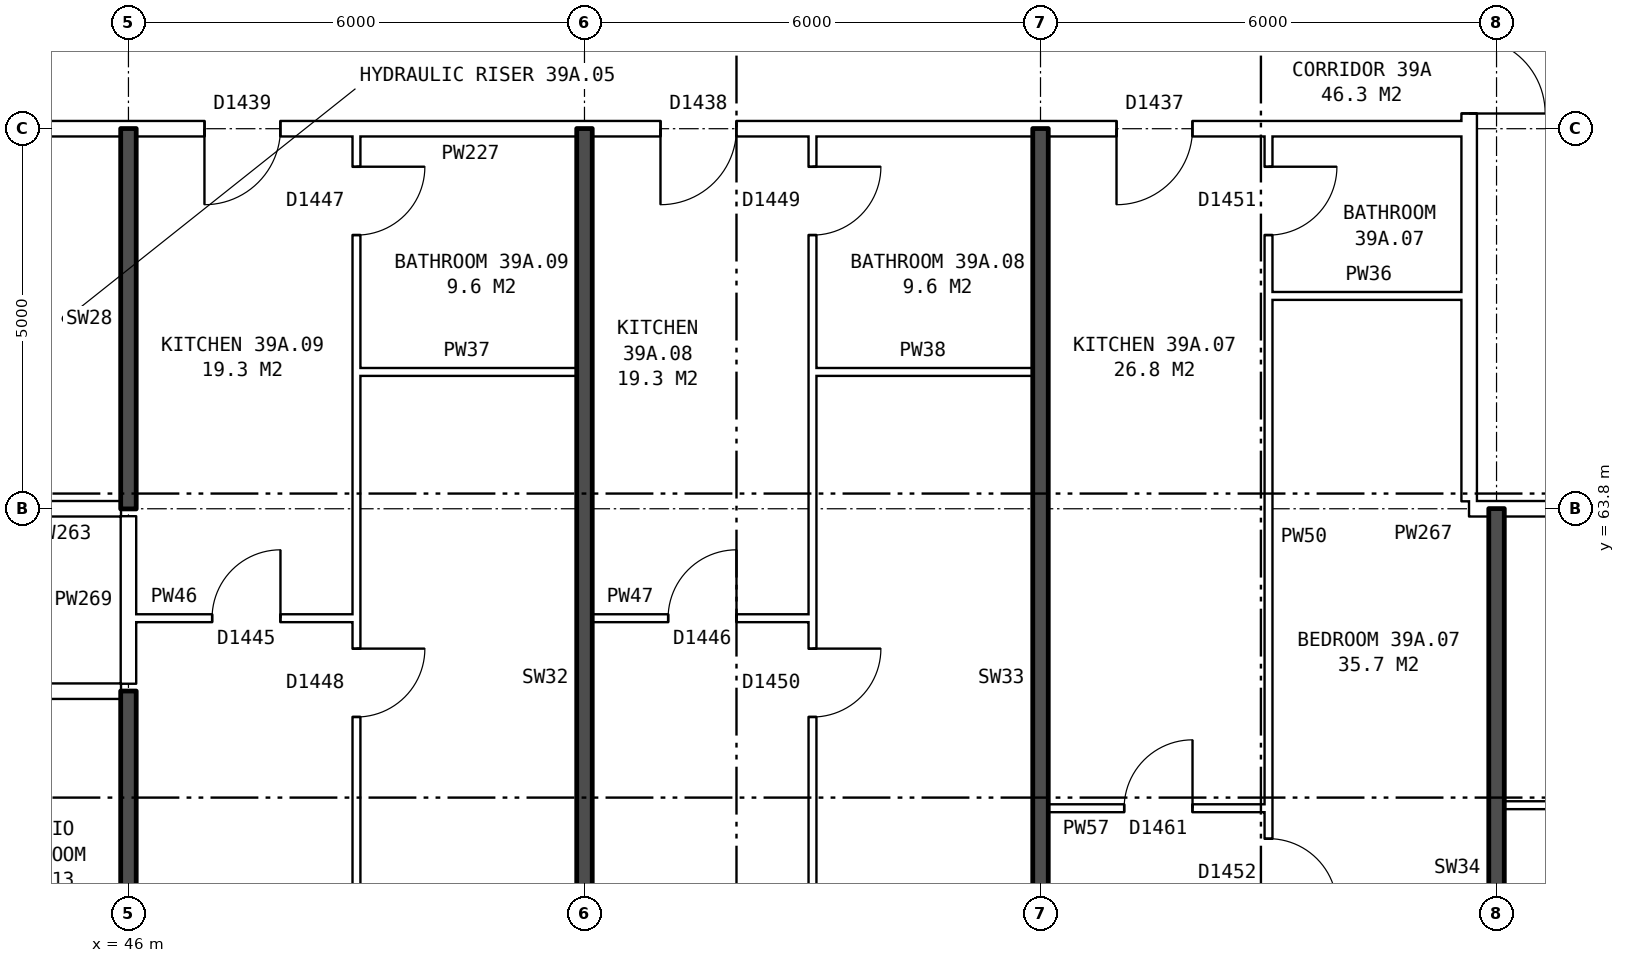
"""IFC4 building model, lengths in metres.
Left out: names, types, materials, properties, quantities, classifications, styles, units other than length and angle.
Written with IfcOpenShell. Run it as: python <this file> out.ifc"""

import sys

from ifc_helpers import new_model, si_unit, direction, frame, frame_2d, origin, place, context, subcontext, project, spatial, rectangle, extrude, element, fill, save


model = new_model("IFC4")
c1 = context("Model", 3, precision=1e-05, world=origin(), true_north=direction((0.0, 1.0)))
c2 = subcontext(c1, "Body", "Model", "MODEL_VIEW")
j1 = project(units=[si_unit("LENGTHUNIT", "METRE"), si_unit("PLANEANGLEUNIT", "RADIAN")], contexts=[c1])
p1 = place(None, origin())
s1 = spatial("IfcSite", under=j1, at=p1, CompositionType="ELEMENT")
p2 = place(p1, origin())
s2 = spatial("IfcBuilding", under=s1, at=p2, CompositionType="ELEMENT")
p3 = place(p2, frame((0.0, 0.0, 139.2)))
s3 = spatial("IfcBuildingStorey", under=s2, at=p3, CompositionType="ELEMENT", Elevation=139.2)
p4 = place(p3, frame((63.64, 63.9, 0.0), z_axis=(0.0, 0.0, 1.0), x_axis=(0.0, 1.0, 0.0)))
e1 = element("IfcWall", 1, at=p4, inside=s3, PredefinedType="PARTITIONING", context=c2, shape_type="SweptSolid", body=[
    extrude(rectangle(XDim=12.2, YDim=0.2, at=frame_2d((6.1, 0.0))), origin(), (0.0, 0.0, 1.0), 2.85),
])
p5 = place(p4, frame((5.1, 0.0, 0.0)))
e2 = element("IfcOpeningElement", 2, at=p5, cuts=e1, PredefinedType="OPENING", context=c2, shape_type="SweptSolid", body=[
    extrude(rectangle(XDim=2.0, YDim=2.1, at=frame_2d((1.0, 1.05))), frame((0.0, 0.11, 0.0), z_axis=(0.0, -1.0, 0.0), x_axis=(1.0, 0.0, 0.0)), (0.0, 0.0, 1.0), 0.22),
])
p6 = place(p3, frame((58.1, 59.86, 0.0), z_axis=(0.0, 0.0, 1.0), x_axis=(1.0, 0.0, 0.0)))
e3 = element("IfcWall", 3, at=p6, inside=s3, PredefinedType="PARTITIONING", context=c2, shape_type="SweptSolid", body=[
    extrude(rectangle(XDim=2.9, YDim=0.1, at=frame_2d((1.45, 0.0))), origin(), (0.0, 0.0, 1.0), 2.85),
])
p7 = place(p6, frame((1.0, 0.0, 0.0)))
e4 = element("IfcOpeningElement", 4, at=p7, cuts=e3, PredefinedType="OPENING", context=c2, shape_type="SweptSolid", body=[
    extrude(rectangle(XDim=0.9, YDim=2.1, at=frame_2d((0.45, 1.05))), frame((0.0, 0.06, 0.0), z_axis=(0.0, -1.0, 0.0), x_axis=(1.0, 0.0, 0.0)), (0.0, 0.0, 1.0), 0.12),
])
p8 = place(p3, frame((64.1, 59.9, 0.0), z_axis=(0.0, 0.0, 1.0), x_axis=(1.0, 0.0, 0.0)))
e5 = element("IfcWall", 5, at=p8, inside=s3, PredefinedType="PARTITIONING", context=c2, shape_type="SweptSolid", body=[
    extrude(rectangle(XDim=5.8, YDim=0.1, at=frame_2d((2.9, 0.0))), origin(), (0.0, 0.0, 1.0), 2.85),
])
p9 = place(p8, frame((3.6, 0.0, 0.0)))
e6 = element("IfcOpeningElement", 6, at=p9, cuts=e5, PredefinedType="OPENING", context=c2, shape_type="SweptSolid", body=[
    extrude(rectangle(XDim=0.9, YDim=2.1, at=frame_2d((0.45, 1.05))), frame((0.0, 0.06, 0.0), z_axis=(0.0, -1.0, 0.0), x_axis=(1.0, 0.0, 0.0)), (0.0, 0.0, 1.0), 0.12),
])
p10 = place(p8, frame((0.7, 0.0, 0.0)))
e7 = element("IfcOpeningElement", 7, at=p10, cuts=e5, PredefinedType="OPENING", context=c2, shape_type="SweptSolid", body=[
    extrude(rectangle(XDim=0.9, YDim=2.1, at=frame_2d((0.45, 1.05))), frame((0.0, 0.06, 0.0), z_axis=(0.0, -1.0, 0.0), x_axis=(1.0, 0.0, 0.0)), (0.0, 0.0, 1.0), 0.12),
])
p11 = place(p3, frame((27.11, 61.4, 0.0), z_axis=(0.0, 0.0, 1.0), x_axis=(1.0, 0.0, 0.0)))
e8 = element("IfcWall", 8, at=p11, inside=s3, PredefinedType="PARTITIONING", context=c2, shape_type="SweptSolid", body=[
    extrude(rectangle(XDim=18.79, YDim=0.2, at=frame_2d((9.395, 0.0))), origin(), (0.0, 0.0, 1.0), 2.85),
])
p12 = place(p11, frame((14.19, 0.0, 0.0)))
e9 = element("IfcOpeningElement", 9, at=p12, cuts=e8, PredefinedType="OPENING", context=c2, shape_type="SweptSolid", body=[
    extrude(rectangle(XDim=1.0, YDim=2.1, at=frame_2d((0.5, 1.05))), frame((0.0, 0.11, 0.0), z_axis=(0.0, -1.0, 0.0), x_axis=(1.0, 0.0, 0.0)), (0.0, 0.0, 1.0), 0.22),
])
p13 = place(p11, frame((8.19, 0.0, 0.0)))
e10 = element("IfcOpeningElement", 10, at=p13, cuts=e8, PredefinedType="OPENING", context=c2, shape_type="SweptSolid", body=[
    extrude(rectangle(XDim=1.0, YDim=2.1, at=frame_2d((0.5, 1.05))), frame((0.0, 0.11, 0.0), z_axis=(0.0, -1.0, 0.0), x_axis=(1.0, 0.0, 0.0)), (0.0, 0.0, 1.0), 0.22),
])
p14 = place(p11, frame((4.59, 0.0, 0.0)))
e11 = element("IfcOpeningElement", 11, at=p14, cuts=e8, PredefinedType="OPENING", context=c2, shape_type="SweptSolid", body=[
    extrude(rectangle(XDim=1.0, YDim=2.1, at=frame_2d((0.5, 1.05))), frame((0.0, 0.11, 0.0), z_axis=(0.0, -1.0, 0.0), x_axis=(1.0, 0.0, 0.0)), (0.0, 0.0, 1.0), 0.22),
])
p15 = place(p3, frame((46.1, 62.36, 0.0), z_axis=(0.0, 0.0, 1.0), x_axis=(1.0, 0.0, 0.0)))
e12 = element("IfcWall", 12, at=p15, inside=s3, PredefinedType="PARTITIONING", context=c2, shape_type="SweptSolid", body=[
    extrude(rectangle(XDim=2.9, YDim=0.1, at=frame_2d((1.45, 0.0))), origin(), (0.0, 0.0, 1.0), 2.85),
])
p16 = place(p15, frame((1.0, 0.0, 0.0)))
e13 = element("IfcOpeningElement", 13, at=p16, cuts=e12, PredefinedType="OPENING", context=c2, shape_type="SweptSolid", body=[
    extrude(rectangle(XDim=0.9, YDim=2.1, at=frame_2d((0.45, 1.05))), frame((0.0, 0.06, 0.0), z_axis=(0.0, -1.0, 0.0), x_axis=(1.0, 0.0, 0.0)), (0.0, 0.0, 1.0), 0.12),
])
p17 = place(p3, frame((52.1, 62.36, 0.0), z_axis=(0.0, 0.0, 1.0), x_axis=(1.0, 0.0, 0.0)))
e14 = element("IfcWall", 14, at=p17, inside=s3, PredefinedType="PARTITIONING", context=c2, shape_type="SweptSolid", body=[
    extrude(rectangle(XDim=2.9, YDim=0.1, at=frame_2d((1.45, 0.0))), origin(), (0.0, 0.0, 1.0), 2.85),
])
p18 = place(p17, frame((1.0, 0.0, 0.0)))
e15 = element("IfcOpeningElement", 15, at=p18, cuts=e14, PredefinedType="OPENING", context=c2, shape_type="SweptSolid", body=[
    extrude(rectangle(XDim=0.9, YDim=2.1, at=frame_2d((0.45, 1.05))), frame((0.0, 0.06, 0.0), z_axis=(0.0, -1.0, 0.0), x_axis=(1.0, 0.0, 0.0)), (0.0, 0.0, 1.0), 0.12),
])
p19 = place(p3, frame((44.36, 63.8, 0.0), z_axis=(0.0, 0.0, 1.0), x_axis=(1.0, 0.0, 0.0)))
e16 = element("IfcWall", 16, at=p19, inside=s3, PredefinedType="PARTITIONING", context=c2, shape_type="SweptSolid", body=[
    extrude(rectangle(XDim=1.54, YDim=0.2, at=frame_2d((0.77, 0.0))), origin(), (0.0, 0.0, 1.0), 2.85),
])
p20 = place(p3, frame((63.64, 63.8, 0.0), z_axis=(0.0, 0.0, 1.0), x_axis=(1.0, 0.0, 0.0)))
e17 = element("IfcWall", 17, at=p20, inside=s3, PredefinedType="PARTITIONING", context=c2, shape_type="SweptSolid", body=[
    extrude(rectangle(XDim=3.0, YDim=0.2, at=frame_2d((1.5, 0.0))), origin(), (0.0, 0.0, 1.0), 2.85),
])
p21 = place(p20, frame((1.18, 0.0, 0.0)))
e18 = element("IfcOpeningElement", 18, at=p21, cuts=e17, PredefinedType="OPENING", context=c2, shape_type="SweptSolid", body=[
    extrude(rectangle(XDim=1.0, YDim=2.1, at=frame_2d((0.5, 1.05))), frame((0.0, 0.11, 0.0), z_axis=(0.0, -1.0, 0.0), x_axis=(1.0, 0.0, 0.0)), (0.0, 0.0, 1.0), 0.22),
])
for number, where, z_axis, x_axis in (
    (19, (49.0, 65.6, 0.0), (0.0, 0.0, 1.0), (1.0, 0.0, 0.0)),
    (20, (55.0, 65.6, 0.0), (0.0, 0.0, 1.0), (1.0, 0.0, 0.0)),
):
    element("IfcWall", number, at=place(p3, frame(where, z_axis=z_axis, x_axis=x_axis)), inside=s3, PredefinedType="PARTITIONING", context=c2, shape_type="SweptSolid", body=[
        extrude(rectangle(XDim=2.9, YDim=0.1, at=frame_2d((1.45, 0.0))), origin(), (0.0, 0.0, 1.0), 2.85),
    ])
p22 = place(p3, frame((61.0, 66.6, 0.0), z_axis=(0.0, 0.0, 1.0), x_axis=(1.0, 0.0, 0.0)))
e21 = element("IfcWall", 21, at=p22, inside=s3, PredefinedType="PARTITIONING", context=c2, shape_type="SweptSolid", body=[
    extrude(rectangle(XDim=2.64, YDim=0.1, at=frame_2d((1.32, 0.0))), origin(), (0.0, 0.0, 1.0), 2.85),
])
p23 = place(p3, frame((44.36, 68.8, 0.0), z_axis=(0.0, 0.0, 1.0), x_axis=(1.0, 0.0, 0.0)))
e22 = element("IfcWall", 22, at=p23, inside=s3, PredefinedType="PARTITIONING", context=c2, shape_type="SweptSolid", body=[
    extrude(rectangle(XDim=19.28, YDim=0.2, at=frame_2d((9.64, 0.0))), origin(), (0.0, 0.0, 1.0), 2.85),
])
p24 = place(p23, frame((14.64, 0.0, 0.0)))
e23 = element("IfcOpeningElement", 23, at=p24, cuts=e22, PredefinedType="OPENING", context=c2, shape_type="SweptSolid", body=[
    extrude(rectangle(XDim=1.0, YDim=2.1, at=frame_2d((0.5, 1.05))), frame((0.0, 0.11, 0.0), z_axis=(0.0, -1.0, 0.0), x_axis=(1.0, 0.0, 0.0)), (0.0, 0.0, 1.0), 0.22),
])
p25 = place(p23, frame((8.64, 0.0, 0.0)))
e24 = element("IfcOpeningElement", 24, at=p25, cuts=e22, PredefinedType="OPENING", context=c2, shape_type="SweptSolid", body=[
    extrude(rectangle(XDim=1.0, YDim=2.1, at=frame_2d((0.5, 1.05))), frame((0.0, 0.11, 0.0), z_axis=(0.0, -1.0, 0.0), x_axis=(1.0, 0.0, 0.0)), (0.0, 0.0, 1.0), 0.22),
])
p26 = place(p23, frame((2.64, 0.0, 0.0)))
e25 = element("IfcOpeningElement", 25, at=p26, cuts=e22, PredefinedType="OPENING", context=c2, shape_type="SweptSolid", body=[
    extrude(rectangle(XDim=1.0, YDim=2.1, at=frame_2d((0.5, 1.05))), frame((0.0, 0.11, 0.0), z_axis=(0.0, -1.0, 0.0), x_axis=(1.0, 0.0, 0.0)), (0.0, 0.0, 1.0), 0.22),
])
p27 = place(p3, frame((46.0, 54.36, 0.0), z_axis=(0.0, 0.0, 1.0), x_axis=(0.0, 1.0, 0.0)))
e26 = element("IfcWall", 26, at=p27, inside=s3, PredefinedType="SOLIDWALL", context=c2, shape_type="SweptSolid", body=[
    extrude(rectangle(XDim=7.04, YDim=0.2, at=frame_2d((3.52, 0.0))), origin(), (0.0, 0.0, 1.0), 2.85),
])
p28 = place(p3, frame((46.0, 61.5, 0.0), z_axis=(0.0, 0.0, 1.0), x_axis=(0.0, 1.0, 0.0)))
e27 = element("IfcWall", 27, at=p28, inside=s3, PredefinedType="PARTITIONING", context=c2, shape_type="SweptSolid", body=[
    extrude(rectangle(XDim=2.2, YDim=0.2, at=frame_2d((1.1, 0.0))), origin(), (0.0, 0.0, 1.0), 2.85),
])
p29 = place(p3, frame((46.0, 63.8, 0.0), z_axis=(0.0, 0.0, 1.0), x_axis=(0.0, 1.0, 0.0)))
e28 = element("IfcWall", 28, at=p29, inside=s3, PredefinedType="SOLIDWALL", context=c2, shape_type="SweptSolid", body=[
    extrude(rectangle(XDim=5.0, YDim=0.2, at=frame_2d((2.5, 0.0))), origin(), (0.0, 0.0, 1.0), 2.85),
])
p30 = place(p3, frame((49.0, 54.36, 0.0), z_axis=(0.0, 0.0, 1.0), x_axis=(0.0, 1.0, 0.0)))
e29 = element("IfcWall", 29, at=p30, inside=s3, PredefinedType="PARTITIONING", context=c2, shape_type="SweptSolid", body=[
    extrude(rectangle(XDim=14.34, YDim=0.1, at=frame_2d((7.17, 0.0))), origin(), (0.0, 0.0, 1.0), 2.85),
])
p31 = place(p30, frame((6.7, 0.0, 0.0)))
e30 = element("IfcOpeningElement", 30, at=p31, cuts=e29, PredefinedType="OPENING", context=c2, shape_type="SweptSolid", body=[
    extrude(rectangle(XDim=0.9, YDim=2.1, at=frame_2d((0.45, 1.05))), frame((0.0, 0.06, 0.0), z_axis=(0.0, -1.0, 0.0), x_axis=(1.0, 0.0, 0.0)), (0.0, 0.0, 1.0), 0.12),
])
p32 = place(p30, frame((13.04, 0.0, 0.0)))
e31 = element("IfcOpeningElement", 31, at=p32, cuts=e29, PredefinedType="OPENING", context=c2, shape_type="SweptSolid", body=[
    extrude(rectangle(XDim=0.9, YDim=2.1, at=frame_2d((0.45, 1.05))), frame((0.0, 0.06, 0.0), z_axis=(0.0, -1.0, 0.0), x_axis=(1.0, 0.0, 0.0)), (0.0, 0.0, 1.0), 0.12),
])
p33 = place(p3, frame((52.0, 54.36, 0.0), z_axis=(0.0, 0.0, 1.0), x_axis=(0.0, 1.0, 0.0)))
e32 = element("IfcWall", 32, at=p33, inside=s3, PredefinedType="SOLIDWALL", context=c2, shape_type="SweptSolid", body=[
    extrude(rectangle(XDim=14.44, YDim=0.2, at=frame_2d((7.22, 0.0))), origin(), (0.0, 0.0, 1.0), 2.85),
])
p34 = place(p3, frame((55.0, 54.36, 0.0), z_axis=(0.0, 0.0, 1.0), x_axis=(0.0, 1.0, 0.0)))
e33 = element("IfcWall", 33, at=p34, inside=s3, PredefinedType="PARTITIONING", context=c2, shape_type="SweptSolid", body=[
    extrude(rectangle(XDim=14.34, YDim=0.1, at=frame_2d((7.17, 0.0))), origin(), (0.0, 0.0, 1.0), 2.85),
])
p35 = place(p34, frame((6.7, 0.0, 0.0)))
e34 = element("IfcOpeningElement", 34, at=p35, cuts=e33, PredefinedType="OPENING", context=c2, shape_type="SweptSolid", body=[
    extrude(rectangle(XDim=0.9, YDim=2.1, at=frame_2d((0.45, 1.05))), frame((0.0, 0.06, 0.0), z_axis=(0.0, -1.0, 0.0), x_axis=(1.0, 0.0, 0.0)), (0.0, 0.0, 1.0), 0.12),
])
p36 = place(p34, frame((13.04, 0.0, 0.0)))
e35 = element("IfcOpeningElement", 35, at=p36, cuts=e33, PredefinedType="OPENING", context=c2, shape_type="SweptSolid", body=[
    extrude(rectangle(XDim=0.9, YDim=2.1, at=frame_2d((0.45, 1.05))), frame((0.0, 0.06, 0.0), z_axis=(0.0, -1.0, 0.0), x_axis=(1.0, 0.0, 0.0)), (0.0, 0.0, 1.0), 0.12),
])
p37 = place(p3, frame((58.0, 54.36, 0.0), z_axis=(0.0, 0.0, 1.0), x_axis=(0.0, 1.0, 0.0)))
e36 = element("IfcWall", 36, at=p37, inside=s3, PredefinedType="SOLIDWALL", context=c2, shape_type="SweptSolid", body=[
    extrude(rectangle(XDim=14.44, YDim=0.2, at=frame_2d((7.22, 0.0))), origin(), (0.0, 0.0, 1.0), 2.85),
])
p38 = place(p3, frame((61.0, 54.36, 0.0), z_axis=(0.0, 0.0, 1.0), x_axis=(0.0, 1.0, 0.0)))
e37 = element("IfcWall", 37, at=p38, inside=s3, PredefinedType="PARTITIONING", context=c2, shape_type="SweptSolid", body=[
    extrude(rectangle(XDim=14.34, YDim=0.1, at=frame_2d((7.17, 0.0))), origin(), (0.0, 0.0, 1.0), 2.85),
])
p39 = place(p38, frame((4.2, 0.0, 0.0)))
e38 = element("IfcOpeningElement", 38, at=p39, cuts=e37, PredefinedType="OPENING", context=c2, shape_type="SweptSolid", body=[
    extrude(rectangle(XDim=0.9, YDim=2.1, at=frame_2d((0.45, 1.05))), frame((0.0, 0.06, 0.0), z_axis=(0.0, -1.0, 0.0), x_axis=(1.0, 0.0, 0.0)), (0.0, 0.0, 1.0), 0.12),
])
p40 = place(p38, frame((13.04, 0.0, 0.0)))
e39 = element("IfcOpeningElement", 39, at=p40, cuts=e37, PredefinedType="OPENING", context=c2, shape_type="SweptSolid", body=[
    extrude(rectangle(XDim=0.9, YDim=2.1, at=frame_2d((0.45, 1.05))), frame((0.0, 0.06, 0.0), z_axis=(0.0, -1.0, 0.0), x_axis=(1.0, 0.0, 0.0)), (0.0, 0.0, 1.0), 0.12),
])
p41 = place(p3, frame((64.0, 54.36, 0.0), z_axis=(0.0, 0.0, 1.0), x_axis=(0.0, 1.0, 0.0)))
e40 = element("IfcWall", 40, at=p41, inside=s3, PredefinedType="SOLIDWALL", context=c2, shape_type="SweptSolid", body=[
    extrude(rectangle(XDim=9.44, YDim=0.2, at=frame_2d((4.72, 0.0))), origin(), (0.0, 0.0, 1.0), 2.85),
])
p42 = place(p5, frame((2.0, 0.0, 0.0), z_axis=(0.0, 0.0, 1.0), x_axis=(-1.0, 0.0, 0.0)))
e41 = element("IfcDoor", 41, at=p42, inside=s3, OperationType="DOUBLE_DOOR_SINGLE_SWING", PredefinedType="DOOR", context=c2, shape_type="SweptSolid", body=[
    extrude(rectangle(XDim=2.0, YDim=2.1, at=frame_2d((1.0, 1.05))), frame((0.0, 0.025, 0.0), z_axis=(0.0, -1.0, 0.0), x_axis=(1.0, 0.0, 0.0)), (0.0, 0.0, 1.0), 0.05),
])
fill(e2, e41)
p43 = place(p39, frame((0.9, 0.0, 0.0), z_axis=(0.0, 0.0, 1.0), x_axis=(-1.0, 0.0, 0.0)))
e42 = element("IfcDoor", 42, at=p43, inside=s3, OperationType="SINGLE_SWING_RIGHT", PredefinedType="DOOR", context=c2, shape_type="SweptSolid", body=[
    extrude(rectangle(XDim=0.9, YDim=2.1, at=frame_2d((0.45, 1.05))), frame((0.0, 0.025, 0.0), z_axis=(0.0, -1.0, 0.0), x_axis=(1.0, 0.0, 0.0)), (0.0, 0.0, 1.0), 0.05),
])
fill(e38, e42)
p44 = place(p24, frame((1.0, 0.0, 0.0), z_axis=(0.0, 0.0, 1.0), x_axis=(-1.0, 0.0, 0.0)))
e43 = element("IfcDoor", 43, at=p44, inside=s3, OperationType="SINGLE_SWING_RIGHT", PredefinedType="DOOR", context=c2, shape_type="SweptSolid", body=[
    extrude(rectangle(XDim=1.0, YDim=2.1, at=frame_2d((0.5, 1.05))), frame((0.0, 0.025, 0.0), z_axis=(0.0, -1.0, 0.0), x_axis=(1.0, 0.0, 0.0)), (0.0, 0.0, 1.0), 0.05),
])
fill(e23, e43)
p45 = place(p7, origin())
e44 = element("IfcDoor", 44, at=p45, inside=s3, OperationType="SINGLE_SWING_RIGHT", PredefinedType="DOOR", context=c2, shape_type="SweptSolid", body=[
    extrude(rectangle(XDim=0.9, YDim=2.1, at=frame_2d((0.45, 1.05))), frame((0.0, 0.025, 0.0), z_axis=(0.0, -1.0, 0.0), x_axis=(1.0, 0.0, 0.0)), (0.0, 0.0, 1.0), 0.05),
])
fill(e4, e44)
p46 = place(p40, frame((0.9, 0.0, 0.0), z_axis=(0.0, 0.0, 1.0), x_axis=(-1.0, 0.0, 0.0)))
e45 = element("IfcDoor", 45, at=p46, inside=s3, OperationType="SINGLE_SWING_LEFT", PredefinedType="DOOR", context=c2, shape_type="SweptSolid", body=[
    extrude(rectangle(XDim=0.9, YDim=2.1, at=frame_2d((0.45, 1.05))), frame((0.0, 0.025, 0.0), z_axis=(0.0, -1.0, 0.0), x_axis=(1.0, 0.0, 0.0)), (0.0, 0.0, 1.0), 0.05),
])
fill(e39, e45)
p47 = place(p35, frame((0.9, 0.0, 0.0), z_axis=(0.0, 0.0, 1.0), x_axis=(-1.0, 0.0, 0.0)))
e46 = element("IfcDoor", 46, at=p47, inside=s3, OperationType="SINGLE_SWING_LEFT", PredefinedType="DOOR", context=c2, shape_type="SweptSolid", body=[
    extrude(rectangle(XDim=0.9, YDim=2.1, at=frame_2d((0.45, 1.05))), frame((0.0, 0.025, 0.0), z_axis=(0.0, -1.0, 0.0), x_axis=(1.0, 0.0, 0.0)), (0.0, 0.0, 1.0), 0.05),
])
fill(e34, e46)
p48 = place(p25, frame((1.0, 0.0, 0.0), z_axis=(0.0, 0.0, 1.0), x_axis=(-1.0, 0.0, 0.0)))
e47 = element("IfcDoor", 47, at=p48, inside=s3, OperationType="SINGLE_SWING_RIGHT", PredefinedType="DOOR", context=c2, shape_type="SweptSolid", body=[
    extrude(rectangle(XDim=1.0, YDim=2.1, at=frame_2d((0.5, 1.05))), frame((0.0, 0.025, 0.0), z_axis=(0.0, -1.0, 0.0), x_axis=(1.0, 0.0, 0.0)), (0.0, 0.0, 1.0), 0.05),
])
fill(e24, e47)
p49 = place(p18, origin())
e48 = element("IfcDoor", 48, at=p49, inside=s3, OperationType="SINGLE_SWING_RIGHT", PredefinedType="DOOR", context=c2, shape_type="SweptSolid", body=[
    extrude(rectangle(XDim=0.9, YDim=2.1, at=frame_2d((0.45, 1.05))), frame((0.0, 0.025, 0.0), z_axis=(0.0, -1.0, 0.0), x_axis=(1.0, 0.0, 0.0)), (0.0, 0.0, 1.0), 0.05),
])
fill(e15, e48)
p50 = place(p36, frame((0.9, 0.0, 0.0), z_axis=(0.0, 0.0, 1.0), x_axis=(-1.0, 0.0, 0.0)))
e49 = element("IfcDoor", 49, at=p50, inside=s3, OperationType="SINGLE_SWING_LEFT", PredefinedType="DOOR", context=c2, shape_type="SweptSolid", body=[
    extrude(rectangle(XDim=0.9, YDim=2.1, at=frame_2d((0.45, 1.05))), frame((0.0, 0.025, 0.0), z_axis=(0.0, -1.0, 0.0), x_axis=(1.0, 0.0, 0.0)), (0.0, 0.0, 1.0), 0.05),
])
fill(e35, e49)
p51 = place(p31, frame((0.9, 0.0, 0.0), z_axis=(0.0, 0.0, 1.0), x_axis=(-1.0, 0.0, 0.0)))
e50 = element("IfcDoor", 50, at=p51, inside=s3, OperationType="SINGLE_SWING_LEFT", PredefinedType="DOOR", context=c2, shape_type="SweptSolid", body=[
    extrude(rectangle(XDim=0.9, YDim=2.1, at=frame_2d((0.45, 1.05))), frame((0.0, 0.025, 0.0), z_axis=(0.0, -1.0, 0.0), x_axis=(1.0, 0.0, 0.0)), (0.0, 0.0, 1.0), 0.05),
])
fill(e30, e50)
p52 = place(p26, frame((1.0, 0.0, 0.0), z_axis=(0.0, 0.0, 1.0), x_axis=(-1.0, 0.0, 0.0)))
e51 = element("IfcDoor", 51, at=p52, inside=s3, OperationType="SINGLE_SWING_RIGHT", PredefinedType="DOOR", context=c2, shape_type="SweptSolid", body=[
    extrude(rectangle(XDim=1.0, YDim=2.1, at=frame_2d((0.5, 1.05))), frame((0.0, 0.025, 0.0), z_axis=(0.0, -1.0, 0.0), x_axis=(1.0, 0.0, 0.0)), (0.0, 0.0, 1.0), 0.05),
])
fill(e25, e51)
p53 = place(p16, origin())
e52 = element("IfcDoor", 52, at=p53, inside=s3, OperationType="SINGLE_SWING_RIGHT", PredefinedType="DOOR", context=c2, shape_type="SweptSolid", body=[
    extrude(rectangle(XDim=0.9, YDim=2.1, at=frame_2d((0.45, 1.05))), frame((0.0, 0.025, 0.0), z_axis=(0.0, -1.0, 0.0), x_axis=(1.0, 0.0, 0.0)), (0.0, 0.0, 1.0), 0.05),
])
fill(e13, e52)
p54 = place(p32, frame((0.9, 0.0, 0.0), z_axis=(0.0, 0.0, 1.0), x_axis=(-1.0, 0.0, 0.0)))
e53 = element("IfcDoor", 53, at=p54, inside=s3, OperationType="SINGLE_SWING_LEFT", PredefinedType="DOOR", context=c2, shape_type="SweptSolid", body=[
    extrude(rectangle(XDim=0.9, YDim=2.1, at=frame_2d((0.45, 1.05))), frame((0.0, 0.025, 0.0), z_axis=(0.0, -1.0, 0.0), x_axis=(1.0, 0.0, 0.0)), (0.0, 0.0, 1.0), 0.05),
])
fill(e31, e53)
save(model, sys.argv[1])
